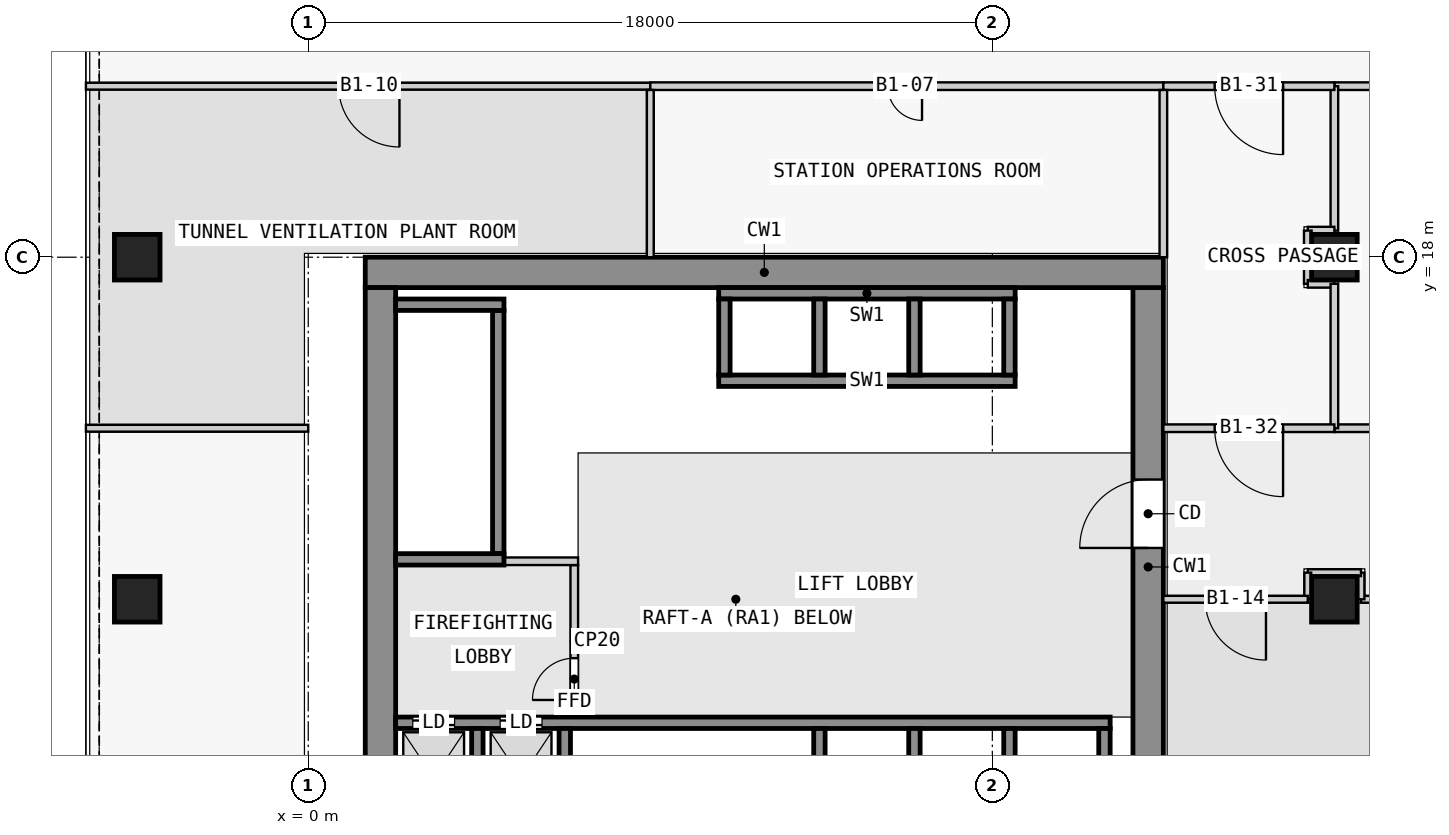
"""IFC4 building model, lengths in metres.
Left out: names, types, materials, properties, quantities, classifications, styles, units other than length and angle.
Written with IfcOpenShell. Run it as: python <this file> out.ifc"""

import sys

from ifc_helpers import new_model, si_unit, direction, frame, frame_2d, origin, origin_2d, place, context, subcontext, project, spatial, rectangle, extrude, element, fill, save


model = new_model("IFC4")
c1 = context("Model", 3, precision=1e-05, world=origin(), true_north=direction((0.0, 1.0)))
c2 = subcontext(c1, "Body", "Model", "MODEL_VIEW")
j1 = project(units=[si_unit("LENGTHUNIT", "METRE"), si_unit("PLANEANGLEUNIT", "RADIAN")], contexts=[c1])
p1 = place(None, origin())
s1 = spatial("IfcSite", under=j1, at=p1, CompositionType="ELEMENT")
p2 = place(p1, origin())
s2 = spatial("IfcBuilding", under=s1, at=p2, CompositionType="ELEMENT")
p3 = place(p2, frame((0.0, 0.0, -7.0)))
s3 = spatial("IfcBuildingStorey", under=s2, at=p3, CompositionType="ELEMENT", Elevation=-7.0)
for number, where, z_axis, x_axis in (
    (1, (-4.5, 9.0, 0.0), (0.0, 0.0, 1.0), (1.0, 0.0, 0.0)),
    (2, (-4.5, 18.0, 0.0), (0.0, 0.0, 1.0), (1.0, 0.0, 0.0)),
    (3, (27.0, 9.0, 0.0), (0.0, 0.0, 1.0), (1.0, 0.0, 0.0)),
    (4, (27.0, 18.0, 0.0), (0.0, 0.0, 1.0), (1.0, 0.0, 0.0)),
):
    element("IfcColumn", number, at=place(p3, frame(where, z_axis=z_axis, x_axis=x_axis)), inside=s3, PredefinedType="COLUMN", context=c2, shape_type="SweptSolid", body=[
        extrude(rectangle(XDim=1.2, YDim=1.2, at=origin_2d()), origin(), (0.0, 0.0, 1.0), 7.0),
    ])
p4 = place(p3, frame((1.5, 17.6, 0.0), z_axis=(0.0, 0.0, 1.0), x_axis=(1.0, 0.0, 0.0)))
e5 = element("IfcWall", 5, at=p4, inside=s3, PredefinedType="SHEAR", context=c2, shape_type="SweptSolid", body=[
    extrude(rectangle(XDim=21.0, YDim=0.8, at=frame_2d((10.5, 0.0))), origin(), (0.0, 0.0, 1.0), 6.55),
])
p5 = place(p3, frame((1.9, 2.5, 0.0), z_axis=(0.0, 0.0, 1.0), x_axis=(0.0, 1.0, 0.0)))
e6 = element("IfcWall", 6, at=p5, inside=s3, PredefinedType="SHEAR", context=c2, shape_type="SweptSolid", body=[
    extrude(rectangle(XDim=14.7, YDim=0.8, at=frame_2d((7.35, 0.0))), origin(), (0.0, 0.0, 1.0), 6.55),
])
p6 = place(p3, frame((22.1, 2.5, 0.0), z_axis=(0.0, 0.0, 1.0), x_axis=(0.0, 1.0, 0.0)))
e7 = element("IfcWall", 7, at=p6, inside=s3, PredefinedType="SHEAR", context=c2, shape_type="SweptSolid", body=[
    extrude(rectangle(XDim=14.7, YDim=0.8, at=frame_2d((7.35, 0.0))), origin(), (0.0, 0.0, 1.0), 6.55),
])
p7 = place(p6, frame((7.85, 0.0, 0.0)))
e8 = element("IfcOpeningElement", 8, at=p7, cuts=e7, PredefinedType="OPENING", context=c2, shape_type="SweptSolid", body=[
    extrude(rectangle(XDim=1.8, YDim=2.1, at=frame_2d((0.9, 1.05))), frame((0.0, 0.41, 0.0), z_axis=(0.0, -1.0, 0.0), x_axis=(1.0, 0.0, 0.0)), (0.0, 0.0, 1.0), 0.82),
])
for number, where, z_axis, x_axis in (
    (9, (4.45, 2.8, 0.0), (0.0, 0.0, 1.0), (0.0, 1.0, 0.0)),
    (10, (6.75, 2.8, 0.0), (0.0, 0.0, 1.0), (0.0, 1.0, 0.0)),
    (11, (13.45, 2.8, 0.0), (0.0, 0.0, 1.0), (0.0, 1.0, 0.0)),
    (12, (15.95, 2.8, 0.0), (0.0, 0.0, 1.0), (0.0, 1.0, 0.0)),
    (13, (18.45, 2.8, 0.0), (0.0, 0.0, 1.0), (0.0, 1.0, 0.0)),
    (14, (20.95, 2.8, 0.0), (0.0, 0.0, 1.0), (0.0, 1.0, 0.0)),
):
    element("IfcWall", number, at=place(p3, frame(where, z_axis=z_axis, x_axis=x_axis)), inside=s3, PredefinedType="SHEAR", context=c2, shape_type="SweptSolid", body=[
        extrude(rectangle(XDim=2.8, YDim=0.3, at=frame_2d((1.4, 0.0))), origin(), (0.0, 0.0, 1.0), 6.55),
    ])
p8 = place(p3, frame((2.3, 5.75, 0.0), z_axis=(0.0, 0.0, 1.0), x_axis=(1.0, 0.0, 0.0)))
e15 = element("IfcWall", 15, at=p8, inside=s3, PredefinedType="SHEAR", context=c2, shape_type="SweptSolid", body=[
    extrude(rectangle(XDim=18.8, YDim=0.3, at=frame_2d((9.4, 0.0))), origin(), (0.0, 0.0, 1.0), 6.55),
])
p9 = place(p8, frame((0.45, 0.0, 0.0)))
e16 = element("IfcOpeningElement", 16, at=p9, cuts=e15, PredefinedType="OPENING", context=c2, shape_type="SweptSolid", body=[
    extrude(rectangle(XDim=1.1, YDim=2.1, at=frame_2d((0.55, 1.05))), frame((0.0, 0.16, 0.0), z_axis=(0.0, -1.0, 0.0), x_axis=(1.0, 0.0, 0.0)), (0.0, 0.0, 1.0), 0.32),
])
p10 = place(p8, frame((2.75, 0.0, 0.0)))
e17 = element("IfcOpeningElement", 17, at=p10, cuts=e15, PredefinedType="OPENING", context=c2, shape_type="SweptSolid", body=[
    extrude(rectangle(XDim=1.1, YDim=2.1, at=frame_2d((0.55, 1.05))), frame((0.0, 0.16, 0.0), z_axis=(0.0, -1.0, 0.0), x_axis=(1.0, 0.0, 0.0)), (0.0, 0.0, 1.0), 0.32),
])
p11 = place(p3, frame((2.3, 10.05, 0.0), z_axis=(0.0, 0.0, 1.0), x_axis=(1.0, 0.0, 0.0)))
e18 = element("IfcWall", 18, at=p11, inside=s3, PredefinedType="SHEAR", context=c2, shape_type="SweptSolid", body=[
    extrude(rectangle(XDim=2.85, YDim=0.3, at=frame_2d((1.425, 0.0))), origin(), (0.0, 0.0, 1.0), 6.55),
])
p12 = place(p3, frame((5.0, 10.2, 0.0), z_axis=(0.0, 0.0, 1.0), x_axis=(0.0, 1.0, 0.0)))
e19 = element("IfcWall", 19, at=p12, inside=s3, PredefinedType="SHEAR", context=c2, shape_type="SweptSolid", body=[
    extrude(rectangle(XDim=6.4, YDim=0.3, at=frame_2d((3.2, 0.0))), origin(), (0.0, 0.0, 1.0), 6.55),
])
p13 = place(p3, frame((2.3, 16.75, 0.0), z_axis=(0.0, 0.0, 1.0), x_axis=(1.0, 0.0, 0.0)))
e20 = element("IfcWall", 20, at=p13, inside=s3, PredefinedType="SHEAR", context=c2, shape_type="SweptSolid", body=[
    extrude(rectangle(XDim=2.85, YDim=0.3, at=frame_2d((1.425, 0.0))), origin(), (0.0, 0.0, 1.0), 6.55),
])
for number, where, z_axis, x_axis in (
    (21, (10.8, 17.05, 0.0), (0.0, 0.0, 1.0), (1.0, 0.0, 0.0)),
    (22, (10.8, 14.75, 0.0), (0.0, 0.0, 1.0), (1.0, 0.0, 0.0)),
):
    element("IfcWall", number, at=place(p3, frame(where, z_axis=z_axis, x_axis=x_axis)), inside=s3, PredefinedType="SHEAR", context=c2, shape_type="SweptSolid", body=[
        extrude(rectangle(XDim=7.8, YDim=0.3, at=frame_2d((3.9, 0.0))), origin(), (0.0, 0.0, 1.0), 6.55),
    ])
for number, where, z_axis, x_axis in (
    (23, (10.95, 14.9, 0.0), (0.0, 0.0, 1.0), (0.0, 1.0, 0.0)),
    (24, (13.45, 14.9, 0.0), (0.0, 0.0, 1.0), (0.0, 1.0, 0.0)),
    (25, (15.95, 14.9, 0.0), (0.0, 0.0, 1.0), (0.0, 1.0, 0.0)),
    (26, (18.45, 14.9, 0.0), (0.0, 0.0, 1.0), (0.0, 1.0, 0.0)),
):
    element("IfcWall", number, at=place(p3, frame(where, z_axis=z_axis, x_axis=x_axis)), inside=s3, PredefinedType="SHEAR", context=c2, shape_type="SweptSolid", body=[
        extrude(rectangle(XDim=2.0, YDim=0.3, at=frame_2d((1.0, 0.0))), origin(), (0.0, 0.0, 1.0), 6.55),
    ])
p14 = place(p3, frame((7.0, 5.9, 0.0), z_axis=(0.0, 0.0, 1.0), x_axis=(0.0, 1.0, 0.0)))
e27 = element("IfcWall", 27, at=p14, inside=s3, PredefinedType="PARTITIONING", context=c2, shape_type="SweptSolid", body=[
    extrude(rectangle(XDim=4.0, YDim=0.2, at=frame_2d((2.0, 0.0))), origin(), (0.0, 0.0, 1.0), 6.55),
])
p15 = place(p14, frame((0.45, 0.0, 0.0)))
e28 = element("IfcOpeningElement", 28, at=p15, cuts=e27, PredefinedType="OPENING", context=c2, shape_type="SweptSolid", body=[
    extrude(rectangle(XDim=1.1, YDim=2.1, at=frame_2d((0.55, 1.05))), frame((0.0, 0.11, 0.0), z_axis=(0.0, -1.0, 0.0), x_axis=(1.0, 0.0, 0.0)), (0.0, 0.0, 1.0), 0.22),
])
p16 = place(p3, frame((5.15, 10.0, 0.0), z_axis=(0.0, 0.0, 1.0), x_axis=(1.0, 0.0, 0.0)))
e29 = element("IfcWall", 29, at=p16, inside=s3, PredefinedType="PARTITIONING", context=c2, shape_type="SweptSolid", body=[
    extrude(rectangle(XDim=1.95, YDim=0.2, at=frame_2d((0.975, 0.0))), origin(), (0.0, 0.0, 1.0), 6.55),
])
p17 = place(p3, frame((74.0, 22.5, 0.0), z_axis=(0.0, 0.0, 1.0), x_axis=(-1.0, 0.0, 0.0)))
e30 = element("IfcWall", 30, at=p17, inside=s3, PredefinedType="PARTITIONING", context=c2, shape_type="SweptSolid", body=[
    extrude(rectangle(XDim=47.0, YDim=0.2, at=frame_2d((23.5, 0.0))), origin(), (0.0, 0.0, 1.0), 6.55),
])
p18 = place(p17, frame((23.1, 0.0, 0.0)))
e31 = element("IfcOpeningElement", 31, at=p18, cuts=e30, PredefinedType="OPENING", context=c2, shape_type="SweptSolid", body=[
    extrude(rectangle(XDim=0.9, YDim=2.1, at=frame_2d((0.45, 1.05))), frame((0.0, 0.11, 0.0), z_axis=(0.0, -1.0, 0.0), x_axis=(1.0, 0.0, 0.0)), (0.0, 0.0, 1.0), 0.22),
])
p19 = place(p3, frame((27.0, 13.5, 0.0), z_axis=(0.0, 0.0, 1.0), x_axis=(1.0, 0.0, 0.0)))
e32 = element("IfcWall", 32, at=p19, inside=s3, PredefinedType="PARTITIONING", context=c2, shape_type="SweptSolid", body=[
    extrude(rectangle(XDim=47.0, YDim=0.2, at=frame_2d((23.5, 0.0))), origin(), (0.0, 0.0, 1.0), 6.55),
])
p20 = place(p3, frame((35.3, 9.0, 0.0), z_axis=(0.0, 0.0, 1.0), x_axis=(-1.0, 0.0, 0.0)))
e33 = element("IfcWall", 33, at=p20, inside=s3, PredefinedType="PARTITIONING", context=c2, shape_type="SweptSolid", body=[
    extrude(rectangle(XDim=7.6, YDim=0.18, at=frame_2d((3.8, 0.0))), origin(), (0.0, 0.0, 1.0), 6.55),
])
p21 = place(p3, frame((27.7, 9.0, 0.0), z_axis=(0.0, 0.0, 1.0), x_axis=(0.0, 1.0, 0.0)))
e34 = element("IfcWall", 34, at=p21, inside=s3, PredefinedType="PARTITIONING", context=c2, shape_type="SweptSolid", body=[
    extrude(rectangle(XDim=0.7, YDim=0.18, at=frame_2d((0.35, 0.0))), origin(), (0.0, 0.0, 1.0), 6.55),
])
p22 = place(p3, frame((27.7, 9.7, 0.0), z_axis=(0.0, 0.0, 1.0), x_axis=(-1.0, 0.0, 0.0)))
e35 = element("IfcWall", 35, at=p22, inside=s3, PredefinedType="PARTITIONING", context=c2, shape_type="SweptSolid", body=[
    extrude(rectangle(XDim=1.4, YDim=0.18, at=frame_2d((0.7, 0.0))), origin(), (0.0, 0.0, 1.0), 6.55),
])
p23 = place(p3, frame((26.3, 9.7, 0.0), z_axis=(0.0, 0.0, 1.0), x_axis=(0.0, -1.0, 0.0)))
e36 = element("IfcWall", 36, at=p23, inside=s3, PredefinedType="PARTITIONING", context=c2, shape_type="SweptSolid", body=[
    extrude(rectangle(XDim=0.7, YDim=0.18, at=frame_2d((0.35, 0.0))), origin(), (0.0, 0.0, 1.0), 6.55),
])
p24 = place(p3, frame((26.3, 9.0, 0.0), z_axis=(0.0, 0.0, 1.0), x_axis=(-1.0, 0.0, 0.0)))
e37 = element("IfcWall", 37, at=p24, inside=s3, PredefinedType="PARTITIONING", context=c2, shape_type="SweptSolid", body=[
    extrude(rectangle(XDim=3.8, YDim=0.18, at=frame_2d((1.9, 0.0))), origin(), (0.0, 0.0, 1.0), 6.55),
])
p25 = place(p24, frame((1.1, 0.0, 0.0)))
e38 = element("IfcOpeningElement", 38, at=p25, cuts=e37, PredefinedType="OPENING", context=c2, shape_type="SweptSolid", body=[
    extrude(rectangle(XDim=1.6, YDim=2.4, at=frame_2d((0.8, 1.2))), frame((0.0, 0.1, 0.0), z_axis=(0.0, -1.0, 0.0), x_axis=(1.0, 0.0, 0.0)), (0.0, 0.0, 1.0), 0.2),
])
p26 = place(p3, frame((9.0, 22.5, 0.0), z_axis=(0.0, 0.0, 1.0), x_axis=(-1.0, 0.0, 0.0)))
e39 = element("IfcWall", 39, at=p26, inside=s3, PredefinedType="PARTITIONING", context=c2, shape_type="SweptSolid", body=[
    extrude(rectangle(XDim=14.85, YDim=0.18, at=frame_2d((7.425, 0.0))), origin(), (0.0, 0.0, 1.0), 6.55),
])
p27 = place(p26, frame((6.6, 0.0, 0.0)))
e40 = element("IfcOpeningElement", 40, at=p27, cuts=e39, PredefinedType="OPENING", context=c2, shape_type="SweptSolid", body=[
    extrude(rectangle(XDim=1.6, YDim=2.4, at=frame_2d((0.8, 1.2))), frame((0.0, 0.1, 0.0), z_axis=(0.0, -1.0, 0.0), x_axis=(1.0, 0.0, 0.0)), (0.0, 0.0, 1.0), 0.2),
])
p28 = place(p3, frame((22.5, 22.5, 0.0), z_axis=(0.0, 0.0, 1.0), x_axis=(-1.0, 0.0, 0.0)))
e41 = element("IfcWall", 41, at=p28, inside=s3, PredefinedType="PARTITIONING", context=c2, shape_type="SweptSolid", body=[
    extrude(rectangle(XDim=13.5, YDim=0.2, at=frame_2d((6.75, 0.0))), origin(), (0.0, 0.0, 1.0), 6.55),
])
p29 = place(p28, frame((6.35, 0.0, 0.0)))
e42 = element("IfcOpeningElement", 42, at=p29, cuts=e41, PredefinedType="OPENING", context=c2, shape_type="SweptSolid", body=[
    extrude(rectangle(XDim=0.9, YDim=2.1, at=frame_2d((0.45, 1.05))), frame((0.0, 0.11, 0.0), z_axis=(0.0, -1.0, 0.0), x_axis=(1.0, 0.0, 0.0)), (0.0, 0.0, 1.0), 0.22),
])
p30 = place(p3, frame((27.0, 22.5, 0.0), z_axis=(0.0, 0.0, 1.0), x_axis=(0.0, -1.0, 0.0)))
e43 = element("IfcWall", 43, at=p30, inside=s3, PredefinedType="PARTITIONING", context=c2, shape_type="SweptSolid", body=[
    extrude(rectangle(XDim=3.8, YDim=0.2, at=frame_2d((1.9, 0.0))), origin(), (0.0, 0.0, 1.0), 6.55),
])
p31 = place(p3, frame((27.0, 18.7, 0.0), z_axis=(0.0, 0.0, 1.0), x_axis=(-1.0, 0.0, 0.0)))
e44 = element("IfcWall", 44, at=p31, inside=s3, PredefinedType="PARTITIONING", context=c2, shape_type="SweptSolid", body=[
    extrude(rectangle(XDim=0.7, YDim=0.2, at=frame_2d((0.35, 0.0))), origin(), (0.0, 0.0, 1.0), 6.55),
])
p32 = place(p3, frame((26.3, 18.7, 0.0), z_axis=(0.0, 0.0, 1.0), x_axis=(0.0, -1.0, 0.0)))
e45 = element("IfcWall", 45, at=p32, inside=s3, PredefinedType="PARTITIONING", context=c2, shape_type="SweptSolid", body=[
    extrude(rectangle(XDim=1.4, YDim=0.2, at=frame_2d((0.7, 0.0))), origin(), (0.0, 0.0, 1.0), 6.55),
])
p33 = place(p3, frame((26.3, 17.3, 0.0), z_axis=(0.0, 0.0, 1.0), x_axis=(1.0, 0.0, 0.0)))
e46 = element("IfcWall", 46, at=p33, inside=s3, PredefinedType="PARTITIONING", context=c2, shape_type="SweptSolid", body=[
    extrude(rectangle(XDim=0.7, YDim=0.2, at=frame_2d((0.35, 0.0))), origin(), (0.0, 0.0, 1.0), 6.55),
])
p34 = place(p3, frame((27.0, 17.3, 0.0), z_axis=(0.0, 0.0, 1.0), x_axis=(0.0, -1.0, 0.0)))
e47 = element("IfcWall", 47, at=p34, inside=s3, PredefinedType="PARTITIONING", context=c2, shape_type="SweptSolid", body=[
    extrude(rectangle(XDim=3.8, YDim=0.2, at=frame_2d((1.9, 0.0))), origin(), (0.0, 0.0, 1.0), 6.55),
])
p35 = place(p3, frame((0.0, 13.5, 0.0), z_axis=(0.0, 0.0, 1.0), x_axis=(-1.0, 0.0, 0.0)))
e48 = element("IfcWall", 48, at=p35, inside=s3, PredefinedType="PARTITIONING", context=c2, shape_type="SweptSolid", body=[
    extrude(rectangle(XDim=5.85, YDim=0.18, at=frame_2d((2.925, 0.0))), origin(), (0.0, 0.0, 1.0), 6.55),
])
p36 = place(p3, frame((27.0, 22.5, 0.0), z_axis=(0.0, 0.0, 1.0), x_axis=(-1.0, 0.0, 0.0)))
e49 = element("IfcWall", 49, at=p36, inside=s3, PredefinedType="PARTITIONING", context=c2, shape_type="SweptSolid", body=[
    extrude(rectangle(XDim=4.5, YDim=0.2, at=frame_2d((2.25, 0.0))), origin(), (0.0, 0.0, 1.0), 6.55),
])
p37 = place(p36, frame((1.35, 0.0, 0.0)))
e50 = element("IfcOpeningElement", 50, at=p37, cuts=e49, PredefinedType="OPENING", context=c2, shape_type="SweptSolid", body=[
    extrude(rectangle(XDim=1.8, YDim=2.1, at=frame_2d((0.9, 1.05))), frame((0.0, 0.11, 0.0), z_axis=(0.0, -1.0, 0.0), x_axis=(1.0, 0.0, 0.0)), (0.0, 0.0, 1.0), 0.22),
])
p38 = place(p3, frame((22.5, 18.0, 0.0), z_axis=(0.0, 0.0, 1.0), x_axis=(0.0, 1.0, 0.0)))
e51 = element("IfcWall", 51, at=p38, inside=s3, PredefinedType="PARTITIONING", context=c2, shape_type="SweptSolid", body=[
    extrude(rectangle(XDim=4.4, YDim=0.2, at=frame_2d((2.2, 0.0))), origin(), (0.0, 0.0, 1.0), 6.55),
])
p39 = place(p3, frame((9.0, 18.0, 0.0), z_axis=(0.0, 0.0, 1.0), x_axis=(0.0, 1.0, 0.0)))
e52 = element("IfcWall", 52, at=p39, inside=s3, PredefinedType="PARTITIONING", context=c2, shape_type="SweptSolid", body=[
    extrude(rectangle(XDim=4.4, YDim=0.18, at=frame_2d((2.2, 0.0))), origin(), (0.0, 0.0, 1.0), 6.55),
])
p40 = place(p3, frame((27.0, 13.5, 0.0), z_axis=(0.0, 0.0, 1.0), x_axis=(-1.0, 0.0, 0.0)))
e53 = element("IfcWall", 53, at=p40, inside=s3, PredefinedType="PARTITIONING", context=c2, shape_type="SweptSolid", body=[
    extrude(rectangle(XDim=4.5, YDim=0.2, at=frame_2d((2.25, 0.0))), origin(), (0.0, 0.0, 1.0), 6.55),
])
p41 = place(p40, frame((1.35, 0.0, 0.0)))
e54 = element("IfcOpeningElement", 54, at=p41, cuts=e53, PredefinedType="OPENING", context=c2, shape_type="SweptSolid", body=[
    extrude(rectangle(XDim=1.8, YDim=2.1, at=frame_2d((0.9, 1.05))), frame((0.0, 0.11, 0.0), z_axis=(0.0, -1.0, 0.0), x_axis=(1.0, 0.0, 0.0)), (0.0, 0.0, 1.0), 0.22),
])
p42 = place(p15, origin())
e55 = element("IfcDoor", 55, at=p42, inside=s3, OperationType="SINGLE_SWING_LEFT", PredefinedType="DOOR", context=c2, shape_type="SweptSolid", body=[
    extrude(rectangle(XDim=1.1, YDim=2.1, at=frame_2d((0.55, 1.05))), frame((0.0, 0.025, 0.0), z_axis=(0.0, -1.0, 0.0), x_axis=(1.0, 0.0, 0.0)), (0.0, 0.0, 1.0), 0.05),
])
fill(e28, e55)
p43 = place(p9, origin())
e56 = element("IfcDoor", 56, at=p43, inside=s3, OperationType="DOUBLE_DOOR_SLIDING", PredefinedType="DOOR", context=c2, shape_type="SweptSolid", body=[
    extrude(rectangle(XDim=1.1, YDim=2.1, at=frame_2d((0.55, 1.05))), frame((0.0, 0.025, 0.0), z_axis=(0.0, -1.0, 0.0), x_axis=(1.0, 0.0, 0.0)), (0.0, 0.0, 1.0), 0.05),
])
fill(e16, e56)
p44 = place(p10, origin())
e57 = element("IfcDoor", 57, at=p44, inside=s3, OperationType="DOUBLE_DOOR_SLIDING", PredefinedType="DOOR", context=c2, shape_type="SweptSolid", body=[
    extrude(rectangle(XDim=1.1, YDim=2.1, at=frame_2d((0.55, 1.05))), frame((0.0, 0.025, 0.0), z_axis=(0.0, -1.0, 0.0), x_axis=(1.0, 0.0, 0.0)), (0.0, 0.0, 1.0), 0.05),
])
fill(e17, e57)
p45 = place(p7, origin())
e58 = element("IfcDoor", 58, at=p45, inside=s3, OperationType="DOUBLE_DOOR_SINGLE_SWING", PredefinedType="DOOR", context=c2, shape_type="SweptSolid", body=[
    extrude(rectangle(XDim=1.8, YDim=2.1, at=frame_2d((0.9, 1.05))), frame((0.0, 0.025, 0.0), z_axis=(0.0, -1.0, 0.0), x_axis=(1.0, 0.0, 0.0)), (0.0, 0.0, 1.0), 0.05),
])
fill(e8, e58)
p46 = place(p29, origin())
e59 = element("IfcDoor", 59, at=p46, inside=s3, OperationType="SINGLE_SWING_LEFT", PredefinedType="DOOR", context=c2, shape_type="SweptSolid", body=[
    extrude(rectangle(XDim=0.9, YDim=2.1, at=frame_2d((0.45, 1.05))), frame((0.0, 0.025, 0.0), z_axis=(0.0, -1.0, 0.0), x_axis=(1.0, 0.0, 0.0)), (0.0, 0.0, 1.0), 0.05),
])
fill(e42, e59)
p47 = place(p27, origin())
e60 = element("IfcDoor", 60, at=p47, inside=s3, OperationType="SINGLE_SWING_LEFT", PredefinedType="DOOR", context=c2, shape_type="SweptSolid", body=[
    extrude(rectangle(XDim=1.6, YDim=2.4, at=frame_2d((0.8, 1.2))), frame((0.0, 0.025, 0.0), z_axis=(0.0, -1.0, 0.0), x_axis=(1.0, 0.0, 0.0)), (0.0, 0.0, 1.0), 0.05),
])
fill(e40, e60)
p48 = place(p25, origin())
e61 = element("IfcDoor", 61, at=p48, inside=s3, OperationType="SINGLE_SWING_LEFT", PredefinedType="DOOR", context=c2, shape_type="SweptSolid", body=[
    extrude(rectangle(XDim=1.6, YDim=2.4, at=frame_2d((0.8, 1.2))), frame((0.0, 0.025, 0.0), z_axis=(0.0, -1.0, 0.0), x_axis=(1.0, 0.0, 0.0)), (0.0, 0.0, 1.0), 0.05),
])
fill(e38, e61)
p49 = place(p37, origin())
e62 = element("IfcDoor", 62, at=p49, inside=s3, OperationType="DOUBLE_DOOR_SINGLE_SWING", PredefinedType="DOOR", context=c2, shape_type="SweptSolid", body=[
    extrude(rectangle(XDim=1.8, YDim=2.1, at=frame_2d((0.9, 1.05))), frame((0.0, 0.025, 0.0), z_axis=(0.0, -1.0, 0.0), x_axis=(1.0, 0.0, 0.0)), (0.0, 0.0, 1.0), 0.05),
])
fill(e50, e62)
p50 = place(p41, origin())
e63 = element("IfcDoor", 63, at=p50, inside=s3, OperationType="DOUBLE_DOOR_SINGLE_SWING", PredefinedType="DOOR", context=c2, shape_type="SweptSolid", body=[
    extrude(rectangle(XDim=1.8, YDim=2.1, at=frame_2d((0.9, 1.05))), frame((0.0, 0.025, 0.0), z_axis=(0.0, -1.0, 0.0), x_axis=(1.0, 0.0, 0.0)), (0.0, 0.0, 1.0), 0.05),
])
fill(e54, e63)
save(model, sys.argv[1])
